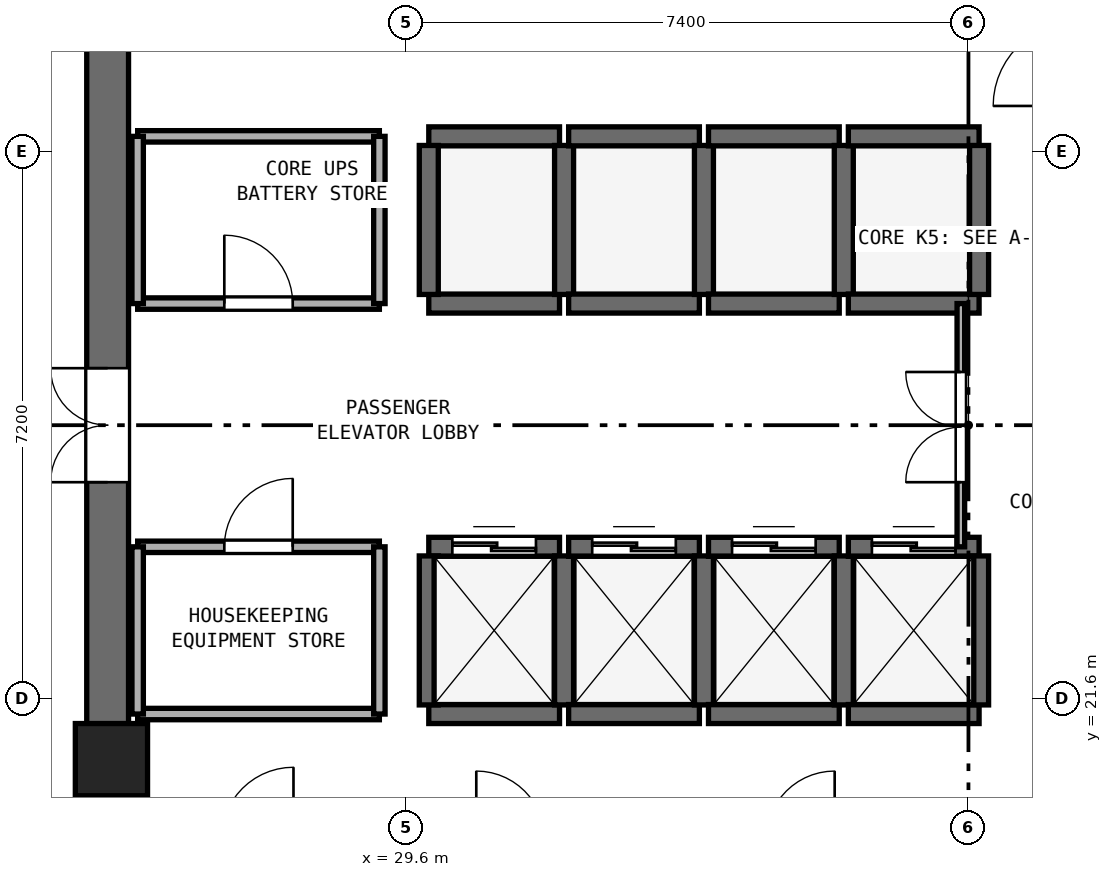
"""IFC4 building model, lengths in metres.
Left out: names, types, materials, properties, quantities, classifications, styles, units other than length and angle.
Written with IfcOpenShell. Run it as: python <this file> out.ifc"""

import sys

from ifc_helpers import new_model, si_unit, direction, frame, frame_2d, origin, origin_2d, place, context, subcontext, project, spatial, rectangle, extrude, element, fill, save


model = new_model("IFC4")
c1 = context("Model", 3, precision=1e-05, world=origin(), true_north=direction((0.0, 1.0)))
c2 = subcontext(c1, "Body", "Model", "MODEL_VIEW")
j1 = project(units=[si_unit("LENGTHUNIT", "METRE"), si_unit("PLANEANGLEUNIT", "RADIAN")], contexts=[c1])
p1 = place(None, origin())
s1 = spatial("IfcSite", under=j1, at=p1, CompositionType="ELEMENT")
p2 = place(p1, origin())
s2 = spatial("IfcBuilding", under=s1, at=p2, CompositionType="ELEMENT")
p3 = place(p2, frame((0.0, 0.0, 193.4)))
s3 = spatial("IfcBuildingStorey", under=s2, at=p3, CompositionType="ELEMENT", Elevation=193.4)
p4 = place(p3, frame((25.675, 17.55, 0.0), z_axis=(0.0, 0.0, 1.0), x_axis=(0.0, 1.0, 0.0)))
e1 = element("IfcWall", 1, at=p4, inside=s3, PredefinedType="SHEAR", context=c2, shape_type="SweptSolid", body=[
    extrude(rectangle(XDim=15.3, YDim=0.55, at=frame_2d((7.65, 0.0))), origin(), (0.0, 0.0, 1.0), 3.54),
])
p5 = place(p4, frame((6.9, 0.0, 0.0)))
e2 = element("IfcOpeningElement", 2, at=p5, cuts=e1, PredefinedType="OPENING", context=c2, shape_type="SweptSolid", body=[
    extrude(rectangle(XDim=1.5, YDim=2.15, at=frame_2d((0.75, 1.075))), frame((0.0, 0.285, 0.0), z_axis=(0.0, -1.0, 0.0), x_axis=(1.0, 0.0, 0.0)), (0.0, 0.0, 1.0), 0.57),
])
p6 = place(p3, frame((25.725, 20.8, 0.0), z_axis=(0.0, 0.0, 1.0), x_axis=(1.0, 0.0, 0.0)))
e3 = element("IfcColumn", 3, at=p6, inside=s3, PredefinedType="PILASTER", context=c2, shape_type="SweptSolid", body=[
    extrude(rectangle(XDim=0.95, YDim=0.95, at=origin_2d()), origin(), (0.0, 0.0, 1.0), 3.8),
])
p7 = place(p3, frame((29.9, 21.4, 0.0), z_axis=(0.0, 0.0, 1.0), x_axis=(1.0, 0.0, 0.0)))
e4 = element("IfcWall", 4, at=p7, inside=s3, PredefinedType="SHEAR", context=c2, shape_type="SweptSolid", body=[
    extrude(rectangle(XDim=1.72, YDim=0.25, at=frame_2d((0.86, 0.0))), origin(), (0.0, 0.0, 1.0), 3.54),
])
p8 = place(p3, frame((29.9, 23.6, 0.0), z_axis=(0.0, 0.0, 1.0), x_axis=(1.0, 0.0, 0.0)))
e5 = element("IfcWall", 5, at=p8, inside=s3, PredefinedType="SHEAR", context=c2, shape_type="SweptSolid", body=[
    extrude(rectangle(XDim=1.72, YDim=0.25, at=frame_2d((0.86, 0.0))), origin(), (0.0, 0.0, 1.0), 3.54),
])
p9 = place(p8, frame((0.31, 0.0, 0.0)))
e6 = element("IfcOpeningElement", 6, at=p9, cuts=e5, PredefinedType="OPENING", context=c2, shape_type="SweptSolid", body=[
    extrude(rectangle(XDim=1.1, YDim=2.15, at=frame_2d((0.55, 1.075))), frame((0.0, 0.135, 0.0), z_axis=(0.0, -1.0, 0.0), x_axis=(1.0, 0.0, 0.0)), (0.0, 0.0, 1.0), 0.27),
])
for number, where, z_axis, x_axis in (
    (7, (29.9, 21.52, 0.0), (0.0, 0.0, 1.0), (0.0, 1.0, 0.0)),
    (8, (31.68, 21.52, 0.0), (0.0, 0.0, 1.0), (0.0, 1.0, 0.0)),
):
    element("IfcWall", number, at=place(p3, frame(where, z_axis=z_axis, x_axis=x_axis)), inside=s3, PredefinedType="SHEAR", context=c2, shape_type="SweptSolid", body=[
        extrude(rectangle(XDim=1.96, YDim=0.25, at=frame_2d((0.98, 0.0))), origin(), (0.0, 0.0, 1.0), 3.54),
    ])
p10 = place(p3, frame((31.74, 21.4, 0.0), z_axis=(0.0, 0.0, 1.0), x_axis=(1.0, 0.0, 0.0)))
e9 = element("IfcWall", 9, at=p10, inside=s3, PredefinedType="SHEAR", context=c2, shape_type="SweptSolid", body=[
    extrude(rectangle(XDim=1.72, YDim=0.25, at=frame_2d((0.86, 0.0))), origin(), (0.0, 0.0, 1.0), 3.54),
])
p11 = place(p3, frame((31.74, 23.6, 0.0), z_axis=(0.0, 0.0, 1.0), x_axis=(1.0, 0.0, 0.0)))
e10 = element("IfcWall", 10, at=p11, inside=s3, PredefinedType="SHEAR", context=c2, shape_type="SweptSolid", body=[
    extrude(rectangle(XDim=1.72, YDim=0.25, at=frame_2d((0.86, 0.0))), origin(), (0.0, 0.0, 1.0), 3.54),
])
p12 = place(p11, frame((0.31, 0.0, 0.0)))
e11 = element("IfcOpeningElement", 11, at=p12, cuts=e10, PredefinedType="OPENING", context=c2, shape_type="SweptSolid", body=[
    extrude(rectangle(XDim=1.1, YDim=2.15, at=frame_2d((0.55, 1.075))), frame((0.0, 0.135, 0.0), z_axis=(0.0, -1.0, 0.0), x_axis=(1.0, 0.0, 0.0)), (0.0, 0.0, 1.0), 0.27),
])
p13 = place(p3, frame((33.52, 21.52, 0.0), z_axis=(0.0, 0.0, 1.0), x_axis=(0.0, 1.0, 0.0)))
e12 = element("IfcWall", 12, at=p13, inside=s3, PredefinedType="SHEAR", context=c2, shape_type="SweptSolid", body=[
    extrude(rectangle(XDim=1.96, YDim=0.25, at=frame_2d((0.98, 0.0))), origin(), (0.0, 0.0, 1.0), 3.54),
])
p14 = place(p3, frame((33.58, 21.4, 0.0), z_axis=(0.0, 0.0, 1.0), x_axis=(1.0, 0.0, 0.0)))
e13 = element("IfcWall", 13, at=p14, inside=s3, PredefinedType="SHEAR", context=c2, shape_type="SweptSolid", body=[
    extrude(rectangle(XDim=1.72, YDim=0.25, at=frame_2d((0.86, 0.0))), origin(), (0.0, 0.0, 1.0), 3.54),
])
p15 = place(p3, frame((33.58, 23.6, 0.0), z_axis=(0.0, 0.0, 1.0), x_axis=(1.0, 0.0, 0.0)))
e14 = element("IfcWall", 14, at=p15, inside=s3, PredefinedType="SHEAR", context=c2, shape_type="SweptSolid", body=[
    extrude(rectangle(XDim=1.72, YDim=0.25, at=frame_2d((0.86, 0.0))), origin(), (0.0, 0.0, 1.0), 3.54),
])
p16 = place(p15, frame((0.31, 0.0, 0.0)))
e15 = element("IfcOpeningElement", 15, at=p16, cuts=e14, PredefinedType="OPENING", context=c2, shape_type="SweptSolid", body=[
    extrude(rectangle(XDim=1.1, YDim=2.15, at=frame_2d((0.55, 1.075))), frame((0.0, 0.135, 0.0), z_axis=(0.0, -1.0, 0.0), x_axis=(1.0, 0.0, 0.0)), (0.0, 0.0, 1.0), 0.27),
])
p17 = place(p3, frame((35.36, 21.52, 0.0), z_axis=(0.0, 0.0, 1.0), x_axis=(0.0, 1.0, 0.0)))
e16 = element("IfcWall", 16, at=p17, inside=s3, PredefinedType="SHEAR", context=c2, shape_type="SweptSolid", body=[
    extrude(rectangle(XDim=1.96, YDim=0.25, at=frame_2d((0.98, 0.0))), origin(), (0.0, 0.0, 1.0), 3.54),
])
p18 = place(p3, frame((35.42, 21.4, 0.0), z_axis=(0.0, 0.0, 1.0), x_axis=(1.0, 0.0, 0.0)))
e17 = element("IfcWall", 17, at=p18, inside=s3, PredefinedType="SHEAR", context=c2, shape_type="SweptSolid", body=[
    extrude(rectangle(XDim=1.72, YDim=0.25, at=frame_2d((0.86, 0.0))), origin(), (0.0, 0.0, 1.0), 3.54),
])
p19 = place(p3, frame((35.42, 23.6, 0.0), z_axis=(0.0, 0.0, 1.0), x_axis=(1.0, 0.0, 0.0)))
e18 = element("IfcWall", 18, at=p19, inside=s3, PredefinedType="SHEAR", context=c2, shape_type="SweptSolid", body=[
    extrude(rectangle(XDim=1.72, YDim=0.25, at=frame_2d((0.86, 0.0))), origin(), (0.0, 0.0, 1.0), 3.54),
])
p20 = place(p19, frame((0.31, 0.0, 0.0)))
e19 = element("IfcOpeningElement", 19, at=p20, cuts=e18, PredefinedType="OPENING", context=c2, shape_type="SweptSolid", body=[
    extrude(rectangle(XDim=1.1, YDim=2.15, at=frame_2d((0.55, 1.075))), frame((0.0, 0.135, 0.0), z_axis=(0.0, -1.0, 0.0), x_axis=(1.0, 0.0, 0.0)), (0.0, 0.0, 1.0), 0.27),
])
p21 = place(p3, frame((37.14, 21.52, 0.0), z_axis=(0.0, 0.0, 1.0), x_axis=(0.0, 1.0, 0.0)))
e20 = element("IfcWall", 20, at=p21, inside=s3, PredefinedType="SHEAR", context=c2, shape_type="SweptSolid", body=[
    extrude(rectangle(XDim=1.96, YDim=0.25, at=frame_2d((0.98, 0.0))), origin(), (0.0, 0.0, 1.0), 3.54),
])
for number, where, z_axis, x_axis in (
    (21, (29.9, 26.8, 0.0), (0.0, 0.0, 1.0), (1.0, 0.0, 0.0)),
    (22, (29.9, 29.0, 0.0), (0.0, 0.0, 1.0), (1.0, 0.0, 0.0)),
):
    element("IfcWall", number, at=place(p3, frame(where, z_axis=z_axis, x_axis=x_axis)), inside=s3, PredefinedType="SHEAR", context=c2, shape_type="SweptSolid", body=[
        extrude(rectangle(XDim=1.72, YDim=0.25, at=frame_2d((0.86, 0.0))), origin(), (0.0, 0.0, 1.0), 3.54),
    ])
for number, where, z_axis, x_axis in (
    (23, (29.9, 26.92, 0.0), (0.0, 0.0, 1.0), (0.0, 1.0, 0.0)),
    (24, (31.68, 26.92, 0.0), (0.0, 0.0, 1.0), (0.0, 1.0, 0.0)),
):
    element("IfcWall", number, at=place(p3, frame(where, z_axis=z_axis, x_axis=x_axis)), inside=s3, PredefinedType="SHEAR", context=c2, shape_type="SweptSolid", body=[
        extrude(rectangle(XDim=1.96, YDim=0.25, at=frame_2d((0.98, 0.0))), origin(), (0.0, 0.0, 1.0), 3.54),
    ])
for number, where, z_axis, x_axis in (
    (25, (31.74, 26.8, 0.0), (0.0, 0.0, 1.0), (1.0, 0.0, 0.0)),
    (26, (31.74, 29.0, 0.0), (0.0, 0.0, 1.0), (1.0, 0.0, 0.0)),
):
    element("IfcWall", number, at=place(p3, frame(where, z_axis=z_axis, x_axis=x_axis)), inside=s3, PredefinedType="SHEAR", context=c2, shape_type="SweptSolid", body=[
        extrude(rectangle(XDim=1.72, YDim=0.25, at=frame_2d((0.86, 0.0))), origin(), (0.0, 0.0, 1.0), 3.54),
    ])
p22 = place(p3, frame((33.52, 26.92, 0.0), z_axis=(0.0, 0.0, 1.0), x_axis=(0.0, 1.0, 0.0)))
e27 = element("IfcWall", 27, at=p22, inside=s3, PredefinedType="SHEAR", context=c2, shape_type="SweptSolid", body=[
    extrude(rectangle(XDim=1.96, YDim=0.25, at=frame_2d((0.98, 0.0))), origin(), (0.0, 0.0, 1.0), 3.54),
])
for number, where, z_axis, x_axis in (
    (28, (33.58, 26.8, 0.0), (0.0, 0.0, 1.0), (1.0, 0.0, 0.0)),
    (29, (33.58, 29.0, 0.0), (0.0, 0.0, 1.0), (1.0, 0.0, 0.0)),
):
    element("IfcWall", number, at=place(p3, frame(where, z_axis=z_axis, x_axis=x_axis)), inside=s3, PredefinedType="SHEAR", context=c2, shape_type="SweptSolid", body=[
        extrude(rectangle(XDim=1.72, YDim=0.25, at=frame_2d((0.86, 0.0))), origin(), (0.0, 0.0, 1.0), 3.54),
    ])
p23 = place(p3, frame((35.36, 26.92, 0.0), z_axis=(0.0, 0.0, 1.0), x_axis=(0.0, 1.0, 0.0)))
e30 = element("IfcWall", 30, at=p23, inside=s3, PredefinedType="SHEAR", context=c2, shape_type="SweptSolid", body=[
    extrude(rectangle(XDim=1.96, YDim=0.25, at=frame_2d((0.98, 0.0))), origin(), (0.0, 0.0, 1.0), 3.54),
])
for number, where, z_axis, x_axis in (
    (31, (35.42, 26.8, 0.0), (0.0, 0.0, 1.0), (1.0, 0.0, 0.0)),
    (32, (35.42, 29.0, 0.0), (0.0, 0.0, 1.0), (1.0, 0.0, 0.0)),
):
    element("IfcWall", number, at=place(p3, frame(where, z_axis=z_axis, x_axis=x_axis)), inside=s3, PredefinedType="SHEAR", context=c2, shape_type="SweptSolid", body=[
        extrude(rectangle(XDim=1.72, YDim=0.25, at=frame_2d((0.86, 0.0))), origin(), (0.0, 0.0, 1.0), 3.54),
    ])
p24 = place(p3, frame((37.14, 26.92, 0.0), z_axis=(0.0, 0.0, 1.0), x_axis=(0.0, 1.0, 0.0)))
e33 = element("IfcWall", 33, at=p24, inside=s3, PredefinedType="SHEAR", context=c2, shape_type="SweptSolid", body=[
    extrude(rectangle(XDim=1.96, YDim=0.25, at=frame_2d((0.98, 0.0))), origin(), (0.0, 0.0, 1.0), 3.54),
])
p25 = place(p3, frame((26.07, 26.8, 0.0), z_axis=(0.0, 0.0, 1.0), x_axis=(1.0, 0.0, 0.0)))
e34 = element("IfcWall", 34, at=p25, inside=s3, PredefinedType="PARTITIONING", context=c2, shape_type="SweptSolid", body=[
    extrude(rectangle(XDim=3.18, YDim=0.15, at=frame_2d((1.59, 0.0))), origin(), (0.0, 0.0, 1.0), 3.54),
])
p26 = place(p25, frame((1.14, 0.0, 0.0)))
e35 = element("IfcOpeningElement", 35, at=p26, cuts=e34, PredefinedType="OPENING", context=c2, shape_type="SweptSolid", body=[
    extrude(rectangle(XDim=0.9, YDim=2.1, at=frame_2d((0.45, 1.05))), frame((0.0, 0.085, 0.0), z_axis=(0.0, -1.0, 0.0), x_axis=(1.0, 0.0, 0.0)), (0.0, 0.0, 1.0), 0.17),
])
p27 = place(p3, frame((26.07, 29.0, 0.0), z_axis=(0.0, 0.0, 1.0), x_axis=(1.0, 0.0, 0.0)))
e36 = element("IfcWall", 36, at=p27, inside=s3, PredefinedType="PARTITIONING", context=c2, shape_type="SweptSolid", body=[
    extrude(rectangle(XDim=3.18, YDim=0.15, at=frame_2d((1.59, 0.0))), origin(), (0.0, 0.0, 1.0), 3.54),
])
p28 = place(p3, frame((26.07, 26.8, 0.0), z_axis=(0.0, 0.0, 1.0), x_axis=(0.0, 1.0, 0.0)))
e37 = element("IfcWall", 37, at=p28, inside=s3, PredefinedType="PARTITIONING", context=c2, shape_type="SweptSolid", body=[
    extrude(rectangle(XDim=2.2, YDim=0.15, at=frame_2d((1.1, 0.0))), origin(), (0.0, 0.0, 1.0), 2.64),
])
p29 = place(p3, frame((29.25, 26.8, 0.0), z_axis=(0.0, 0.0, 1.0), x_axis=(0.0, 1.0, 0.0)))
e38 = element("IfcWall", 38, at=p29, inside=s3, PredefinedType="PARTITIONING", context=c2, shape_type="SweptSolid", body=[
    extrude(rectangle(XDim=2.2, YDim=0.15, at=frame_2d((1.1, 0.0))), origin(), (0.0, 0.0, 1.0), 3.54),
])
p30 = place(p3, frame((26.07, 21.4, 0.0), z_axis=(0.0, 0.0, 1.0), x_axis=(1.0, 0.0, 0.0)))
e39 = element("IfcWall", 39, at=p30, inside=s3, PredefinedType="PARTITIONING", context=c2, shape_type="SweptSolid", body=[
    extrude(rectangle(XDim=3.18, YDim=0.15, at=frame_2d((1.59, 0.0))), origin(), (0.0, 0.0, 1.0), 3.54),
])
p31 = place(p3, frame((26.07, 23.6, 0.0), z_axis=(0.0, 0.0, 1.0), x_axis=(1.0, 0.0, 0.0)))
e40 = element("IfcWall", 40, at=p31, inside=s3, PredefinedType="PARTITIONING", context=c2, shape_type="SweptSolid", body=[
    extrude(rectangle(XDim=3.18, YDim=0.15, at=frame_2d((1.59, 0.0))), origin(), (0.0, 0.0, 1.0), 3.54),
])
p32 = place(p31, frame((1.14, 0.0, 0.0)))
e41 = element("IfcOpeningElement", 41, at=p32, cuts=e40, PredefinedType="OPENING", context=c2, shape_type="SweptSolid", body=[
    extrude(rectangle(XDim=0.9, YDim=2.1, at=frame_2d((0.45, 1.05))), frame((0.0, 0.085, 0.0), z_axis=(0.0, -1.0, 0.0), x_axis=(1.0, 0.0, 0.0)), (0.0, 0.0, 1.0), 0.17),
])
p33 = place(p3, frame((26.07, 21.4, 0.0), z_axis=(0.0, 0.0, 1.0), x_axis=(0.0, 1.0, 0.0)))
e42 = element("IfcWall", 42, at=p33, inside=s3, PredefinedType="PARTITIONING", context=c2, shape_type="SweptSolid", body=[
    extrude(rectangle(XDim=2.2, YDim=0.15, at=frame_2d((1.1, 0.0))), origin(), (0.0, 0.0, 1.0), 2.64),
])
p34 = place(p3, frame((29.25, 21.4, 0.0), z_axis=(0.0, 0.0, 1.0), x_axis=(0.0, 1.0, 0.0)))
e43 = element("IfcWall", 43, at=p34, inside=s3, PredefinedType="PARTITIONING", context=c2, shape_type="SweptSolid", body=[
    extrude(rectangle(XDim=2.2, YDim=0.15, at=frame_2d((1.1, 0.0))), origin(), (0.0, 0.0, 1.0), 3.54),
])
p35 = place(p3, frame((36.9, 23.6, 0.0), z_axis=(0.0, 0.0, 1.0), x_axis=(0.0, 1.0, 0.0)))
e44 = element("IfcWall", 44, at=p35, inside=s3, PredefinedType="PARTITIONING", context=c2, shape_type="SweptSolid", body=[
    extrude(rectangle(XDim=3.2, YDim=0.1, at=frame_2d((1.6, 0.0))), origin(), (0.0, 0.0, 1.0), 3.54),
])
p36 = place(p35, frame((0.85, 0.0, 0.0)))
e45 = element("IfcOpeningElement", 45, at=p36, cuts=e44, PredefinedType="OPENING", context=c2, shape_type="SweptSolid", body=[
    extrude(rectangle(XDim=1.45, YDim=2.12, at=frame_2d((0.725, 1.06))), frame((0.0, 0.06, 0.0), z_axis=(0.0, -1.0, 0.0), x_axis=(1.0, 0.0, 0.0)), (0.0, 0.0, 1.0), 0.12),
])
p37 = place(p9, origin())
e46 = element("IfcDoor", 46, at=p37, inside=s3, OperationType="DOUBLE_DOOR_SLIDING", PredefinedType="DOOR", context=c2, shape_type="SweptSolid", body=[
    extrude(rectangle(XDim=1.1, YDim=2.15, at=frame_2d((0.55, 1.075))), frame((0.0, 0.025, 0.0), z_axis=(0.0, -1.0, 0.0), x_axis=(1.0, 0.0, 0.0)), (0.0, 0.0, 1.0), 0.05),
])
fill(e6, e46)
p38 = place(p12, origin())
e47 = element("IfcDoor", 47, at=p38, inside=s3, OperationType="DOUBLE_DOOR_SLIDING", PredefinedType="DOOR", context=c2, shape_type="SweptSolid", body=[
    extrude(rectangle(XDim=1.1, YDim=2.15, at=frame_2d((0.55, 1.075))), frame((0.0, 0.025, 0.0), z_axis=(0.0, -1.0, 0.0), x_axis=(1.0, 0.0, 0.0)), (0.0, 0.0, 1.0), 0.05),
])
fill(e11, e47)
p39 = place(p16, origin())
e48 = element("IfcDoor", 48, at=p39, inside=s3, OperationType="DOUBLE_DOOR_SLIDING", PredefinedType="DOOR", context=c2, shape_type="SweptSolid", body=[
    extrude(rectangle(XDim=1.1, YDim=2.15, at=frame_2d((0.55, 1.075))), frame((0.0, 0.025, 0.0), z_axis=(0.0, -1.0, 0.0), x_axis=(1.0, 0.0, 0.0)), (0.0, 0.0, 1.0), 0.05),
])
fill(e15, e48)
p40 = place(p20, origin())
e49 = element("IfcDoor", 49, at=p40, inside=s3, OperationType="DOUBLE_DOOR_SLIDING", PredefinedType="DOOR", context=c2, shape_type="SweptSolid", body=[
    extrude(rectangle(XDim=1.1, YDim=2.15, at=frame_2d((0.55, 1.075))), frame((0.0, 0.025, 0.0), z_axis=(0.0, -1.0, 0.0), x_axis=(1.0, 0.0, 0.0)), (0.0, 0.0, 1.0), 0.05),
])
fill(e19, e49)
p41 = place(p5, origin())
e50 = element("IfcDoor", 50, at=p41, inside=s3, OperationType="DOUBLE_DOOR_SINGLE_SWING", PredefinedType="DOOR", context=c2, shape_type="SweptSolid", body=[
    extrude(rectangle(XDim=1.5, YDim=2.15, at=frame_2d((0.75, 1.075))), frame((0.0, 0.025, 0.0), z_axis=(0.0, -1.0, 0.0), x_axis=(1.0, 0.0, 0.0)), (0.0, 0.0, 1.0), 0.05),
])
fill(e2, e50)
p42 = place(p26, origin())
e51 = element("IfcDoor", 51, at=p42, inside=s3, OperationType="SINGLE_SWING_LEFT", PredefinedType="DOOR", context=c2, shape_type="SweptSolid", body=[
    extrude(rectangle(XDim=0.9, YDim=2.1, at=frame_2d((0.45, 1.05))), frame((0.0, 0.025, 0.0), z_axis=(0.0, -1.0, 0.0), x_axis=(1.0, 0.0, 0.0)), (0.0, 0.0, 1.0), 0.05),
])
fill(e35, e51)
p43 = place(p32, origin())
e52 = element("IfcDoor", 52, at=p43, inside=s3, OperationType="SINGLE_SWING_RIGHT", PredefinedType="DOOR", context=c2, shape_type="SweptSolid", body=[
    extrude(rectangle(XDim=0.9, YDim=2.1, at=frame_2d((0.45, 1.05))), frame((0.0, 0.025, 0.0), z_axis=(0.0, -1.0, 0.0), x_axis=(1.0, 0.0, 0.0)), (0.0, 0.0, 1.0), 0.05),
])
fill(e41, e52)
p44 = place(p36, origin())
e53 = element("IfcDoor", 53, at=p44, inside=s3, OperationType="DOUBLE_DOOR_SINGLE_SWING", PredefinedType="DOOR", context=c2, shape_type="SweptSolid", body=[
    extrude(rectangle(XDim=1.45, YDim=2.12, at=frame_2d((0.725, 1.06))), frame((0.0, 0.025, 0.0), z_axis=(0.0, -1.0, 0.0), x_axis=(1.0, 0.0, 0.0)), (0.0, 0.0, 1.0), 0.05),
])
fill(e45, e53)
save(model, sys.argv[1])
